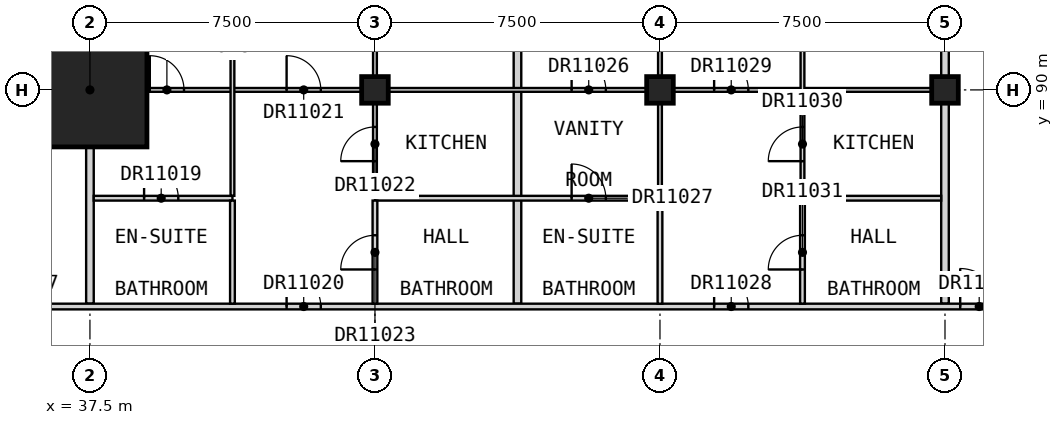
"""IFC4 building model, lengths in metres.
Left out: names, types, materials, properties, quantities, classifications, styles, units other than length and angle.
Written with IfcOpenShell. Run it as: python <this file> out.ifc"""

import sys

from ifc_helpers import new_model, si_unit, direction, frame, frame_2d, origin, origin_2d, place, context, subcontext, project, spatial, rectangle, extrude, element, fill, save


model = new_model("IFC4")
c1 = context("Model", 3, precision=1e-05, world=origin(), true_north=direction((0.0, 1.0)))
c2 = subcontext(c1, "Body", "Model", "MODEL_VIEW")
j1 = project(units=[si_unit("LENGTHUNIT", "METRE"), si_unit("PLANEANGLEUNIT", "RADIAN")], contexts=[c1])
p1 = place(None, origin())
s1 = spatial("IfcSite", under=j1, at=p1, CompositionType="ELEMENT")
p2 = place(p1, origin())
s2 = spatial("IfcBuilding", under=s1, at=p2, CompositionType="ELEMENT")
p3 = place(p2, frame((0.0, 0.0, 276.7)))
s3 = spatial("IfcBuildingStorey", under=s2, at=p3, CompositionType="ELEMENT", Elevation=276.7)
for number, where, z_axis, x_axis in (
    (1, (45.0, 90.0, 0.0), (0.0, 0.0, 1.0), (1.0, 0.0, 0.0)),
    (2, (52.5, 90.0, 0.0), (0.0, 0.0, 1.0), (1.0, 0.0, 0.0)),
    (3, (60.0, 90.0, 0.0), (0.0, 0.0, 1.0), (1.0, 0.0, 0.0)),
):
    element("IfcColumn", number, at=place(p3, frame(where, z_axis=z_axis, x_axis=x_axis)), inside=s3, PredefinedType="COLUMN", context=c2, shape_type="SweptSolid", body=[
        extrude(rectangle(XDim=0.7, YDim=0.7, at=origin_2d()), origin(), (0.0, 0.0, 1.0), 3.5),
    ])
p4 = place(p3, frame((37.5, 90.0, 0.0), z_axis=(0.0, 0.0, 1.0), x_axis=(1.0, 0.0, 0.0)))
e4 = element("IfcColumn", 4, at=p4, inside=s3, PredefinedType="COLUMN", context=c2, shape_type="SweptSolid", body=[
    extrude(rectangle(XDim=3.0, YDim=3.0, at=origin_2d()), origin(), (0.0, 0.0, 1.0), 3.5),
])
p5 = place(p3, frame((37.5, 84.375, 0.0), z_axis=(0.0, 0.0, 1.0), x_axis=(0.0, 1.0, 0.0)))
e5 = element("IfcWall", 5, at=p5, inside=s3, PredefinedType="PARTITIONING", context=c2, shape_type="SweptSolid", body=[
    extrude(rectangle(XDim=13.125, YDim=0.2, at=frame_2d((6.562, 0.0))), origin(), (0.0, 0.0, 1.0), 2.75),
])
p6 = place(p3, frame((48.75, 84.375, 0.0), z_axis=(0.0, 0.0, 1.0), x_axis=(0.0, 1.0, 0.0)))
e6 = element("IfcWall", 6, at=p6, inside=s3, PredefinedType="PARTITIONING", context=c2, shape_type="SweptSolid", body=[
    extrude(rectangle(XDim=12.315, YDim=0.2, at=frame_2d((6.157, 0.0))), origin(), (0.0, 0.0, 1.0), 3.25),
])
p7 = place(p3, frame((60.0, 84.375, 0.0), z_axis=(0.0, 0.0, 1.0), x_axis=(0.0, 1.0, 0.0)))
e7 = element("IfcWall", 7, at=p7, inside=s3, PredefinedType="PARTITIONING", context=c2, shape_type="SweptSolid", body=[
    extrude(rectangle(XDim=13.125, YDim=0.2, at=frame_2d((6.562, 0.0))), origin(), (0.0, 0.0, 1.0), 3.25),
])
p8 = place(p3, frame((33.75, 84.3, 0.0), z_axis=(0.0, 0.0, 1.0), x_axis=(1.0, 0.0, 0.0)))
e8 = element("IfcWall", 8, at=p8, inside=s3, PredefinedType="PARTITIONING", context=c2, shape_type="SweptSolid", body=[
    extrude(rectangle(XDim=28.05, YDim=0.15, at=frame_2d((14.025, 0.0))), origin(), (0.0, 0.0, 1.0), 3.25),
])
p9 = place(p8, frame((1.375, 0.0, 0.0)))
e9 = element("IfcOpeningElement", 9, at=p9, cuts=e8, PredefinedType="OPENING", context=c2, shape_type="SweptSolid", body=[
    extrude(rectangle(XDim=1.0, YDim=2.1, at=frame_2d((0.5, 1.05))), frame((0.0, 0.085, 0.0), z_axis=(0.0, -1.0, 0.0), x_axis=(1.0, 0.0, 0.0)), (0.0, 0.0, 1.0), 0.17),
])
p10 = place(p8, frame((8.925, 0.0, 0.0)))
e10 = element("IfcOpeningElement", 10, at=p10, cuts=e8, PredefinedType="OPENING", context=c2, shape_type="SweptSolid", body=[
    extrude(rectangle(XDim=0.9, YDim=2.1, at=frame_2d((0.45, 1.05))), frame((0.0, 0.085, 0.0), z_axis=(0.0, -1.0, 0.0), x_axis=(1.0, 0.0, 0.0)), (0.0, 0.0, 1.0), 0.17),
])
p11 = place(p8, frame((20.175, 0.0, 0.0)))
e11 = element("IfcOpeningElement", 11, at=p11, cuts=e8, PredefinedType="OPENING", context=c2, shape_type="SweptSolid", body=[
    extrude(rectangle(XDim=0.9, YDim=2.1, at=frame_2d((0.45, 1.05))), frame((0.0, 0.085, 0.0), z_axis=(0.0, -1.0, 0.0), x_axis=(1.0, 0.0, 0.0)), (0.0, 0.0, 1.0), 0.17),
])
p12 = place(p8, frame((26.65, 0.0, 0.0)))
e12 = element("IfcOpeningElement", 12, at=p12, cuts=e8, PredefinedType="OPENING", context=c2, shape_type="SweptSolid", body=[
    extrude(rectangle(XDim=1.0, YDim=2.1, at=frame_2d((0.5, 1.05))), frame((0.0, 0.085, 0.0), z_axis=(0.0, -1.0, 0.0), x_axis=(1.0, 0.0, 0.0)), (0.0, 0.0, 1.0), 0.17),
])
p13 = place(p3, frame((37.6, 90.0, 0.0), z_axis=(0.0, 0.0, 1.0), x_axis=(1.0, 0.0, 0.0)))
e13 = element("IfcWall", 13, at=p13, inside=s3, PredefinedType="PARTITIONING", context=c2, shape_type="SweptSolid", body=[
    extrude(rectangle(XDim=22.3, YDim=0.1, at=frame_2d((11.15, 0.0))), origin(), (0.0, 0.0, 1.0), 3.25),
])
p14 = place(p13, frame((1.475, 0.0, 0.0)))
e14 = element("IfcOpeningElement", 14, at=p14, cuts=e13, PredefinedType="OPENING", context=c2, shape_type="SweptSolid", body=[
    extrude(rectangle(XDim=0.9, YDim=2.1, at=frame_2d((0.45, 1.05))), frame((0.0, 0.06, 0.0), z_axis=(0.0, -1.0, 0.0), x_axis=(1.0, 0.0, 0.0)), (0.0, 0.0, 1.0), 0.12),
])
p15 = place(p13, frame((5.075, 0.0, 0.0)))
e15 = element("IfcOpeningElement", 15, at=p15, cuts=e13, PredefinedType="OPENING", context=c2, shape_type="SweptSolid", body=[
    extrude(rectangle(XDim=0.9, YDim=2.1, at=frame_2d((0.45, 1.05))), frame((0.0, 0.06, 0.0), z_axis=(0.0, -1.0, 0.0), x_axis=(1.0, 0.0, 0.0)), (0.0, 0.0, 1.0), 0.12),
])
p16 = place(p13, frame((12.575, 0.0, 0.0)))
e16 = element("IfcOpeningElement", 16, at=p16, cuts=e13, PredefinedType="OPENING", context=c2, shape_type="SweptSolid", body=[
    extrude(rectangle(XDim=0.9, YDim=2.1, at=frame_2d((0.45, 1.05))), frame((0.0, 0.06, 0.0), z_axis=(0.0, -1.0, 0.0), x_axis=(1.0, 0.0, 0.0)), (0.0, 0.0, 1.0), 0.12),
])
p17 = place(p13, frame((16.325, 0.0, 0.0)))
e17 = element("IfcOpeningElement", 17, at=p17, cuts=e13, PredefinedType="OPENING", context=c2, shape_type="SweptSolid", body=[
    extrude(rectangle(XDim=0.9, YDim=2.1, at=frame_2d((0.45, 1.05))), frame((0.0, 0.06, 0.0), z_axis=(0.0, -1.0, 0.0), x_axis=(1.0, 0.0, 0.0)), (0.0, 0.0, 1.0), 0.12),
])
p18 = place(p3, frame((41.25, 87.212, 0.0), z_axis=(0.0, 0.0, 1.0), x_axis=(0.0, 1.0, 0.0)))
e18 = element("IfcWall", 18, at=p18, inside=s3, PredefinedType="PARTITIONING", context=c2, shape_type="SweptSolid", body=[
    extrude(rectangle(XDim=9.478, YDim=0.1, at=frame_2d((4.739, 0.0))), origin(), (0.0, 0.0, 1.0), 3.25),
])
p19 = place(p18, frame((6.087, 0.0, 0.0)))
e19 = element("IfcOpeningElement", 19, at=p19, cuts=e18, PredefinedType="OPENING", context=c2, shape_type="SweptSolid", body=[
    extrude(rectangle(XDim=0.9, YDim=2.1, at=frame_2d((0.45, 1.05))), frame((0.0, 0.06, 0.0), z_axis=(0.0, -1.0, 0.0), x_axis=(1.0, 0.0, 0.0)), (0.0, 0.0, 1.0), 0.12),
])
p20 = place(p3, frame((45.0, 87.212, 0.0), z_axis=(0.0, 0.0, 1.0), x_axis=(0.0, 1.0, 0.0)))
e20 = element("IfcWall", 20, at=p20, inside=s3, PredefinedType="PARTITIONING", context=c2, shape_type="SweptSolid", body=[
    extrude(rectangle(XDim=10.288, YDim=0.1, at=frame_2d((5.144, 0.0))), origin(), (0.0, 0.0, 1.0), 3.25),
])
p21 = place(p20, frame((0.913, 0.0, 0.0)))
e21 = element("IfcOpeningElement", 21, at=p21, cuts=e20, PredefinedType="OPENING", context=c2, shape_type="SweptSolid", body=[
    extrude(rectangle(XDim=0.9, YDim=2.1, at=frame_2d((0.45, 1.05))), frame((0.0, 0.06, 0.0), z_axis=(0.0, -1.0, 0.0), x_axis=(1.0, 0.0, 0.0)), (0.0, 0.0, 1.0), 0.12),
])
p22 = place(p20, frame((6.087, 0.0, 0.0)))
e22 = element("IfcOpeningElement", 22, at=p22, cuts=e20, PredefinedType="OPENING", context=c2, shape_type="SweptSolid", body=[
    extrude(rectangle(XDim=0.9, YDim=2.1, at=frame_2d((0.45, 1.05))), frame((0.0, 0.06, 0.0), z_axis=(0.0, -1.0, 0.0), x_axis=(1.0, 0.0, 0.0)), (0.0, 0.0, 1.0), 0.12),
])
p23 = place(p3, frame((52.5, 87.212, 0.0), z_axis=(0.0, 0.0, 1.0), x_axis=(0.0, 1.0, 0.0)))
e23 = element("IfcWall", 23, at=p23, inside=s3, PredefinedType="PARTITIONING", context=c2, shape_type="SweptSolid", body=[
    extrude(rectangle(XDim=10.288, YDim=0.1, at=frame_2d((5.144, 0.0))), origin(), (0.0, 0.0, 1.0), 3.25),
])
p24 = place(p23, frame((6.087, 0.0, 0.0)))
e24 = element("IfcOpeningElement", 24, at=p24, cuts=e23, PredefinedType="OPENING", context=c2, shape_type="SweptSolid", body=[
    extrude(rectangle(XDim=0.9, YDim=2.1, at=frame_2d((0.45, 1.05))), frame((0.0, 0.06, 0.0), z_axis=(0.0, -1.0, 0.0), x_axis=(1.0, 0.0, 0.0)), (0.0, 0.0, 1.0), 0.12),
])
p25 = place(p3, frame((56.25, 87.212, 0.0), z_axis=(0.0, 0.0, 1.0), x_axis=(0.0, 1.0, 0.0)))
e25 = element("IfcWall", 25, at=p25, inside=s3, PredefinedType="PARTITIONING", context=c2, shape_type="SweptSolid", body=[
    extrude(rectangle(XDim=9.478, YDim=0.1, at=frame_2d((4.739, 0.0))), origin(), (0.0, 0.0, 1.0), 3.25),
])
p26 = place(p25, frame((0.913, 0.0, 0.0)))
e26 = element("IfcOpeningElement", 26, at=p26, cuts=e25, PredefinedType="OPENING", context=c2, shape_type="SweptSolid", body=[
    extrude(rectangle(XDim=0.9, YDim=2.1, at=frame_2d((0.45, 1.05))), frame((0.0, 0.06, 0.0), z_axis=(0.0, -1.0, 0.0), x_axis=(1.0, 0.0, 0.0)), (0.0, 0.0, 1.0), 0.12),
])
p27 = place(p25, frame((6.087, 0.0, 0.0)))
e27 = element("IfcOpeningElement", 27, at=p27, cuts=e25, PredefinedType="OPENING", context=c2, shape_type="SweptSolid", body=[
    extrude(rectangle(XDim=0.9, YDim=2.1, at=frame_2d((0.45, 1.05))), frame((0.0, 0.06, 0.0), z_axis=(0.0, -1.0, 0.0), x_axis=(1.0, 0.0, 0.0)), (0.0, 0.0, 1.0), 0.12),
])
p28 = place(p3, frame((37.6, 87.15, 0.0), z_axis=(0.0, 0.0, 1.0), x_axis=(1.0, 0.0, 0.0)))
e28 = element("IfcWall", 28, at=p28, inside=s3, PredefinedType="PARTITIONING", context=c2, shape_type="SweptSolid", body=[
    extrude(rectangle(XDim=3.65, YDim=0.125, at=frame_2d((1.825, 0.0))), origin(), (0.0, 0.0, 1.0), 3.25),
])
p29 = place(p28, frame((1.325, 0.0, 0.0)))
e29 = element("IfcOpeningElement", 29, at=p29, cuts=e28, PredefinedType="OPENING", context=c2, shape_type="SweptSolid", body=[
    extrude(rectangle(XDim=0.9, YDim=2.1, at=frame_2d((0.45, 1.05))), frame((0.0, 0.073, 0.0), z_axis=(0.0, -1.0, 0.0), x_axis=(1.0, 0.0, 0.0)), (0.0, 0.0, 1.0), 0.145),
])
p30 = place(p3, frame((45.0, 87.15, 0.0), z_axis=(0.0, 0.0, 1.0), x_axis=(1.0, 0.0, 0.0)))
e30 = element("IfcWall", 30, at=p30, inside=s3, PredefinedType="PARTITIONING", context=c2, shape_type="SweptSolid", body=[
    extrude(rectangle(XDim=7.5, YDim=0.125, at=frame_2d((3.75, 0.0))), origin(), (0.0, 0.0, 1.0), 3.25),
])
p31 = place(p30, frame((5.175, 0.0, 0.0)))
e31 = element("IfcOpeningElement", 31, at=p31, cuts=e30, PredefinedType="OPENING", context=c2, shape_type="SweptSolid", body=[
    extrude(rectangle(XDim=0.9, YDim=2.1, at=frame_2d((0.45, 1.05))), frame((0.0, 0.073, 0.0), z_axis=(0.0, -1.0, 0.0), x_axis=(1.0, 0.0, 0.0)), (0.0, 0.0, 1.0), 0.145),
])
p32 = place(p3, frame((56.25, 87.15, 0.0), z_axis=(0.0, 0.0, 1.0), x_axis=(1.0, 0.0, 0.0)))
e32 = element("IfcWall", 32, at=p32, inside=s3, PredefinedType="PARTITIONING", context=c2, shape_type="SweptSolid", body=[
    extrude(rectangle(XDim=3.65, YDim=0.125, at=frame_2d((1.825, 0.0))), origin(), (0.0, 0.0, 1.0), 3.25),
])
p33 = place(p3, frame((41.25, 84.375, 0.0), z_axis=(0.0, 0.0, 1.0), x_axis=(0.0, 1.0, 0.0)))
e33 = element("IfcWall", 33, at=p33, inside=s3, PredefinedType="PARTITIONING", context=c2, shape_type="SweptSolid", body=[
    extrude(rectangle(XDim=2.712, YDim=0.125, at=frame_2d((1.356, 0.0))), origin(), (0.0, 0.0, 1.0), 3.25),
])
p34 = place(p3, frame((45.0, 84.375, 0.0), z_axis=(0.0, 0.0, 1.0), x_axis=(0.0, 1.0, 0.0)))
e34 = element("IfcWall", 34, at=p34, inside=s3, PredefinedType="PARTITIONING", context=c2, shape_type="SweptSolid", body=[
    extrude(rectangle(XDim=2.712, YDim=0.125, at=frame_2d((1.356, 0.0))), origin(), (0.0, 0.0, 1.0), 3.25),
])
p35 = place(p34, frame((0.9, 0.0, 0.0)))
e35 = element("IfcOpeningElement", 35, at=p35, cuts=e34, PredefinedType="OPENING", context=c2, shape_type="SweptSolid", body=[
    extrude(rectangle(XDim=0.9, YDim=2.1, at=frame_2d((0.45, 1.05))), frame((0.0, 0.073, 0.0), z_axis=(0.0, -1.0, 0.0), x_axis=(1.0, 0.0, 0.0)), (0.0, 0.0, 1.0), 0.145),
])
p36 = place(p3, frame((52.5, 84.375, 0.0), z_axis=(0.0, 0.0, 1.0), x_axis=(0.0, 1.0, 0.0)))
e36 = element("IfcWall", 36, at=p36, inside=s3, PredefinedType="PARTITIONING", context=c2, shape_type="SweptSolid", body=[
    extrude(rectangle(XDim=2.712, YDim=0.125, at=frame_2d((1.356, 0.0))), origin(), (0.0, 0.0, 1.0), 3.25),
])
p37 = place(p3, frame((56.25, 84.375, 0.0), z_axis=(0.0, 0.0, 1.0), x_axis=(0.0, 1.0, 0.0)))
e37 = element("IfcWall", 37, at=p37, inside=s3, PredefinedType="PARTITIONING", context=c2, shape_type="SweptSolid", body=[
    extrude(rectangle(XDim=2.712, YDim=0.125, at=frame_2d((1.356, 0.0))), origin(), (0.0, 0.0, 1.0), 3.25),
])
p38 = place(p37, frame((0.9, 0.0, 0.0)))
e38 = element("IfcOpeningElement", 38, at=p38, cuts=e37, PredefinedType="OPENING", context=c2, shape_type="SweptSolid", body=[
    extrude(rectangle(XDim=0.9, YDim=2.1, at=frame_2d((0.45, 1.05))), frame((0.0, 0.073, 0.0), z_axis=(0.0, -1.0, 0.0), x_axis=(1.0, 0.0, 0.0)), (0.0, 0.0, 1.0), 0.145),
])
p39 = place(p14, origin())
e39 = element("IfcDoor", 39, at=p39, inside=s3, OperationType="SINGLE_SWING_LEFT", PredefinedType="DOOR", context=c2, shape_type="SweptSolid", body=[
    extrude(rectangle(XDim=0.9, YDim=2.1, at=frame_2d((0.45, 1.05))), frame((0.0, 0.025, 0.0), z_axis=(0.0, -1.0, 0.0), x_axis=(1.0, 0.0, 0.0)), (0.0, 0.0, 1.0), 0.05),
])
fill(e14, e39)
p40 = place(p29, origin())
e40 = element("IfcDoor", 40, at=p40, inside=s3, OperationType="SINGLE_SWING_RIGHT", PredefinedType="DOOR", context=c2, shape_type="SweptSolid", body=[
    extrude(rectangle(XDim=0.9, YDim=2.1, at=frame_2d((0.45, 1.05))), frame((0.0, 0.025, 0.0), z_axis=(0.0, -1.0, 0.0), x_axis=(1.0, 0.0, 0.0)), (0.0, 0.0, 1.0), 0.05),
])
fill(e29, e40)
p41 = place(p10, origin())
e41 = element("IfcDoor", 41, at=p41, inside=s3, OperationType="SINGLE_SWING_LEFT", PredefinedType="DOOR", context=c2, shape_type="SweptSolid", body=[
    extrude(rectangle(XDim=0.9, YDim=2.1, at=frame_2d((0.45, 1.05))), frame((0.0, 0.025, 0.0), z_axis=(0.0, -1.0, 0.0), x_axis=(1.0, 0.0, 0.0)), (0.0, 0.0, 1.0), 0.05),
])
fill(e10, e41)
p42 = place(p15, origin())
e42 = element("IfcDoor", 42, at=p42, inside=s3, OperationType="SINGLE_SWING_RIGHT", PredefinedType="DOOR", context=c2, shape_type="SweptSolid", body=[
    extrude(rectangle(XDim=0.9, YDim=2.1, at=frame_2d((0.45, 1.05))), frame((0.0, 0.025, 0.0), z_axis=(0.0, -1.0, 0.0), x_axis=(1.0, 0.0, 0.0)), (0.0, 0.0, 1.0), 0.05),
])
fill(e15, e42)
p43 = place(p21, origin())
e43 = element("IfcDoor", 43, at=p43, inside=s3, OperationType="SINGLE_SWING_LEFT", PredefinedType="DOOR", context=c2, shape_type="SweptSolid", body=[
    extrude(rectangle(XDim=0.9, YDim=2.1, at=frame_2d((0.45, 1.05))), frame((0.0, 0.025, 0.0), z_axis=(0.0, -1.0, 0.0), x_axis=(1.0, 0.0, 0.0)), (0.0, 0.0, 1.0), 0.05),
])
fill(e21, e43)
p44 = place(p35, origin())
e44 = element("IfcDoor", 44, at=p44, inside=s3, OperationType="SINGLE_SWING_RIGHT", PredefinedType="DOOR", context=c2, shape_type="SweptSolid", body=[
    extrude(rectangle(XDim=0.9, YDim=2.1, at=frame_2d((0.45, 1.05))), frame((0.0, 0.025, 0.0), z_axis=(0.0, -1.0, 0.0), x_axis=(1.0, 0.0, 0.0)), (0.0, 0.0, 1.0), 0.05),
])
fill(e35, e44)
p45 = place(p16, origin())
e45 = element("IfcDoor", 45, at=p45, inside=s3, OperationType="SINGLE_SWING_RIGHT", PredefinedType="DOOR", context=c2, shape_type="SweptSolid", body=[
    extrude(rectangle(XDim=0.9, YDim=2.1, at=frame_2d((0.45, 1.05))), frame((0.0, 0.025, 0.0), z_axis=(0.0, -1.0, 0.0), x_axis=(1.0, 0.0, 0.0)), (0.0, 0.0, 1.0), 0.05),
])
fill(e16, e45)
p46 = place(p31, origin())
e46 = element("IfcDoor", 46, at=p46, inside=s3, OperationType="SINGLE_SWING_RIGHT", PredefinedType="DOOR", context=c2, shape_type="SweptSolid", body=[
    extrude(rectangle(XDim=0.9, YDim=2.1, at=frame_2d((0.45, 1.05))), frame((0.0, 0.025, 0.0), z_axis=(0.0, -1.0, 0.0), x_axis=(1.0, 0.0, 0.0)), (0.0, 0.0, 1.0), 0.05),
])
fill(e31, e46)
p47 = place(p11, origin())
e47 = element("IfcDoor", 47, at=p47, inside=s3, OperationType="SINGLE_SWING_LEFT", PredefinedType="DOOR", context=c2, shape_type="SweptSolid", body=[
    extrude(rectangle(XDim=0.9, YDim=2.1, at=frame_2d((0.45, 1.05))), frame((0.0, 0.025, 0.0), z_axis=(0.0, -1.0, 0.0), x_axis=(1.0, 0.0, 0.0)), (0.0, 0.0, 1.0), 0.05),
])
fill(e11, e47)
p48 = place(p17, origin())
e48 = element("IfcDoor", 48, at=p48, inside=s3, OperationType="SINGLE_SWING_RIGHT", PredefinedType="DOOR", context=c2, shape_type="SweptSolid", body=[
    extrude(rectangle(XDim=0.9, YDim=2.1, at=frame_2d((0.45, 1.05))), frame((0.0, 0.025, 0.0), z_axis=(0.0, -1.0, 0.0), x_axis=(1.0, 0.0, 0.0)), (0.0, 0.0, 1.0), 0.05),
])
fill(e17, e48)
p49 = place(p26, origin())
e49 = element("IfcDoor", 49, at=p49, inside=s3, OperationType="SINGLE_SWING_LEFT", PredefinedType="DOOR", context=c2, shape_type="SweptSolid", body=[
    extrude(rectangle(XDim=0.9, YDim=2.1, at=frame_2d((0.45, 1.05))), frame((0.0, 0.025, 0.0), z_axis=(0.0, -1.0, 0.0), x_axis=(1.0, 0.0, 0.0)), (0.0, 0.0, 1.0), 0.05),
])
fill(e26, e49)
p50 = place(p38, origin())
e50 = element("IfcDoor", 50, at=p50, inside=s3, OperationType="SINGLE_SWING_RIGHT", PredefinedType="DOOR", context=c2, shape_type="SweptSolid", body=[
    extrude(rectangle(XDim=0.9, YDim=2.1, at=frame_2d((0.45, 1.05))), frame((0.0, 0.025, 0.0), z_axis=(0.0, -1.0, 0.0), x_axis=(1.0, 0.0, 0.0)), (0.0, 0.0, 1.0), 0.05),
])
fill(e38, e50)
p51 = place(p12, origin())
e51 = element("IfcDoor", 51, at=p51, inside=s3, OperationType="SINGLE_SWING_LEFT", PredefinedType="DOOR", context=c2, shape_type="SweptSolid", body=[
    extrude(rectangle(XDim=1.0, YDim=2.1, at=frame_2d((0.5, 1.05))), frame((0.0, 0.025, 0.0), z_axis=(0.0, -1.0, 0.0), x_axis=(1.0, 0.0, 0.0)), (0.0, 0.0, 1.0), 0.05),
])
fill(e12, e51)
save(model, sys.argv[1])
